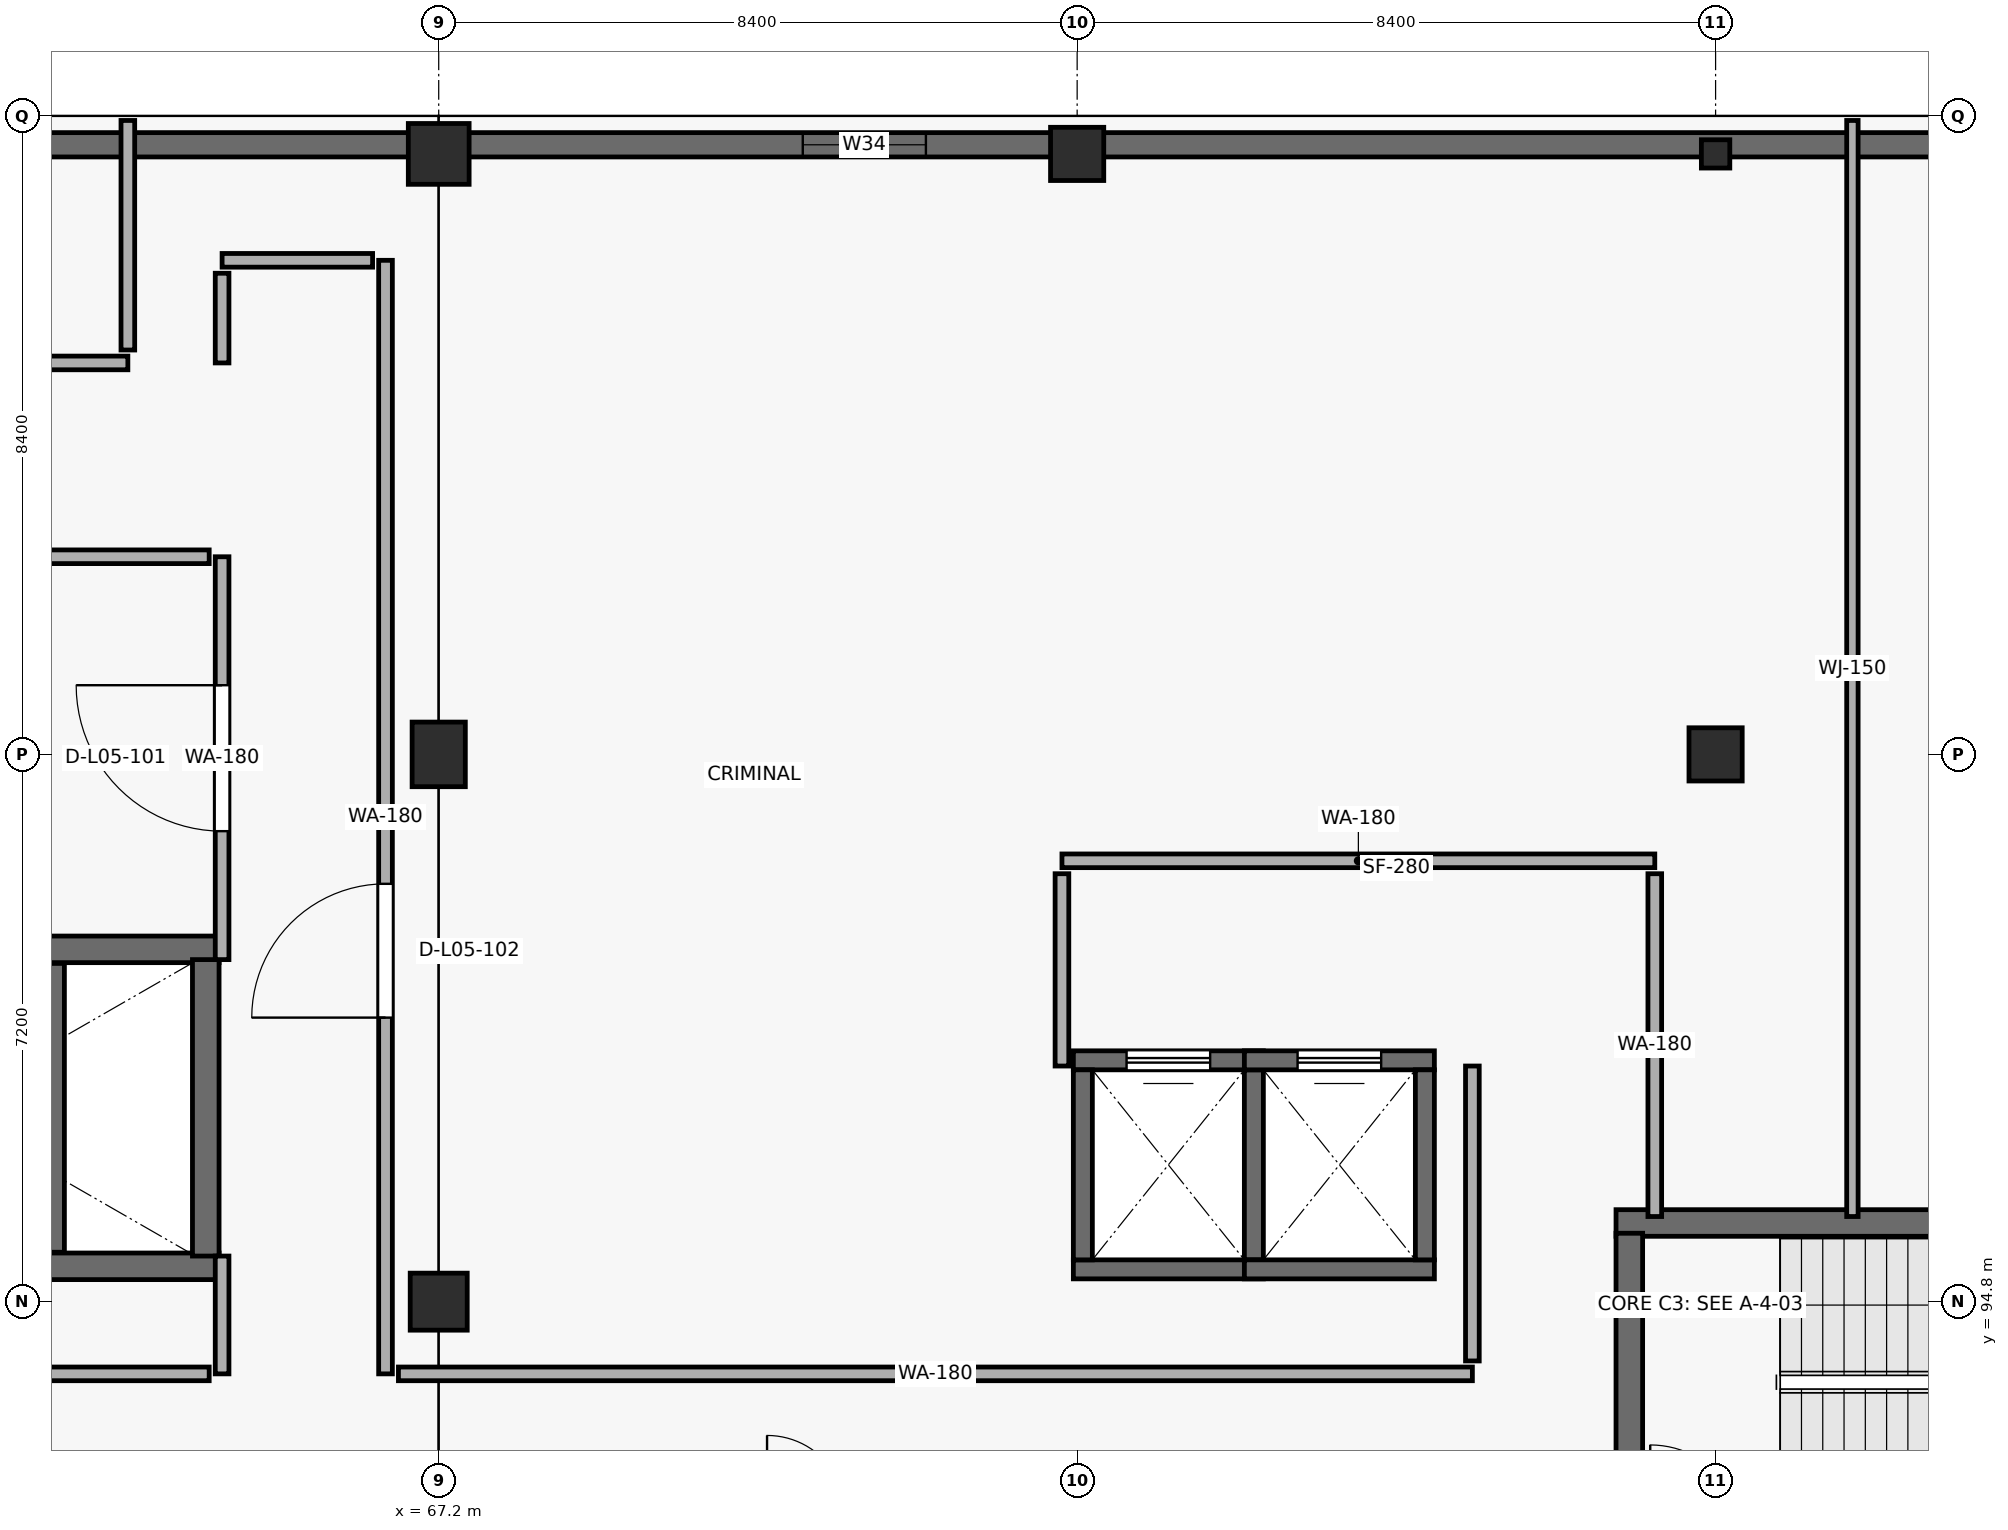
"""IFC4 building model, lengths in metres.
Left out: names, types, materials, properties, quantities, classifications, styles, units other than length and angle.
Written with IfcOpenShell. Run it as: python <this file> out.ifc"""

import sys

from ifc_helpers import new_model, si_unit, direction, frame, frame_2d, origin, origin_2d, place, context, subcontext, project, spatial, rectangle, i_section, extrude, element, fill, save


model = new_model("IFC4")
c1 = context("Model", 3, precision=1e-05, world=origin(), true_north=direction((0.0, 1.0)))
c2 = subcontext(c1, "Body", "Model", "MODEL_VIEW")
j1 = project(units=[si_unit("LENGTHUNIT", "METRE"), si_unit("PLANEANGLEUNIT", "RADIAN")], contexts=[c1])
p1 = place(None, origin())
s1 = spatial("IfcSite", under=j1, at=p1, CompositionType="ELEMENT")
p2 = place(p1, origin())
s2 = spatial("IfcBuilding", under=s1, at=p2, CompositionType="ELEMENT")
p3 = place(p2, frame((0.0, 0.0, 20.4)))
s3 = spatial("IfcBuildingStorey", under=s2, at=p3, CompositionType="ELEMENT", Elevation=20.4)
p4 = place(p3, frame((67.2, 94.8, 0.0), z_axis=(0.0, 0.0, 1.0), x_axis=(1.0, 0.0, 0.0)))
e1 = element("IfcColumn", 1, at=p4, inside=s3, PredefinedType="COLUMN", context=c2, shape_type="SweptSolid", body=[
    extrude(rectangle(XDim=0.75, YDim=0.75, at=origin_2d()), origin(), (0.0, 0.0, 1.0), 5.1),
])
p5 = place(p3, frame((67.2, 102.0, 0.0), z_axis=(0.0, 0.0, 1.0), x_axis=(1.0, 0.0, 0.0)))
e2 = element("IfcColumn", 2, at=p5, inside=s3, PredefinedType="COLUMN", context=c2, shape_type="SweptSolid", body=[
    extrude(rectangle(XDim=0.7, YDim=0.85, at=origin_2d()), origin(), (0.0, 0.0, 1.0), 5.1),
])
p6 = place(p3, frame((67.2, 109.9, 0.0), z_axis=(0.0, 0.0, 1.0), x_axis=(1.0, 0.0, 0.0)))
e3 = element("IfcColumn", 3, at=p6, inside=s3, PredefinedType="COLUMN", context=c2, shape_type="SweptSolid", body=[
    extrude(rectangle(XDim=0.8, YDim=0.8, at=origin_2d()), origin(), (0.0, 0.0, 1.0), 5.1),
])
for number, where, z_axis, x_axis in (
    (4, (75.6, 109.9, 0.0), (0.0, 0.0, 1.0), (1.0, 0.0, 0.0)),
    (5, (84.0, 102.0, 0.0), (0.0, 0.0, 1.0), (1.0, 0.0, 0.0)),
):
    element("IfcColumn", number, at=place(p3, frame(where, z_axis=z_axis, x_axis=x_axis)), inside=s3, PredefinedType="COLUMN", context=c2, shape_type="SweptSolid", body=[
        extrude(rectangle(XDim=0.7, YDim=0.7, at=origin_2d()), origin(), (0.0, 0.0, 1.0), 5.1),
    ])
p7 = place(p3, frame((84.0, 109.9, 0.0), z_axis=(0.0, 0.0, 1.0), x_axis=(1.0, 0.0, 0.0)))
e6 = element("IfcColumn", 6, at=p7, inside=s3, PredefinedType="COLUMN", context=c2, shape_type="SweptSolid", body=[
    extrude(i_section(OverallWidth=0.374, OverallDepth=0.372, WebThickness=0.016, FlangeThickness=0.026, at=origin_2d()), origin(), (0.0, 0.0, 1.0), 5.1),
])
p8 = place(p3, frame((33.6, 110.02, 0.0), z_axis=(0.0, 0.0, 1.0), x_axis=(1.0, 0.0, 0.0)))
e7 = element("IfcWall", 7, at=p8, inside=s3, PredefinedType="SOLIDWALL", context=c2, shape_type="SweptSolid", body=[
    extrude(rectangle(XDim=33.6, YDim=0.32, at=frame_2d((16.8, 0.0))), origin(), (0.0, 0.0, 1.0), 4.84),
])
p9 = place(p3, frame((67.2, 110.02, 0.0), z_axis=(0.0, 0.0, 1.0), x_axis=(1.0, 0.0, 0.0)))
e8 = element("IfcWall", 8, at=p9, inside=s3, PredefinedType="SOLIDWALL", context=c2, shape_type="SweptSolid", body=[
    extrude(rectangle(XDim=25.2, YDim=0.32, at=frame_2d((12.6, 0.0))), origin(), (0.0, 0.0, 1.0), 4.84),
])
p10 = place(p9, frame((4.79, 0.0, 0.75)))
e9 = element("IfcOpeningElement", 9, at=p10, cuts=e8, PredefinedType="OPENING", context=c2, shape_type="SweptSolid", body=[
    extrude(rectangle(XDim=1.62, YDim=3.05, at=frame_2d((0.81, 1.525))), frame((0.0, 0.17, 0.0), z_axis=(0.0, -1.0, 0.0), x_axis=(1.0, 0.0, 0.0)), (0.0, 0.0, 1.0), 0.34),
])
p11 = place(p3, frame((55.09, 95.265, 0.0), z_axis=(0.0, 0.0, 1.0), x_axis=(1.0, 0.0, 0.0)))
e10 = element("IfcWall", 10, at=p11, inside=s3, PredefinedType="SHEAR", context=c2, shape_type="SweptSolid", body=[
    extrude(rectangle(XDim=9.22, YDim=0.35, at=frame_2d((4.61, 0.0))), origin(), (0.0, 0.0, 1.0), 4.84),
])
p12 = place(p11, frame((0.45, 0.0, 0.0)))
e11 = element("IfcOpeningElement", 11, at=p12, cuts=e10, PredefinedType="OPENING", context=c2, shape_type="SweptSolid", body=[
    extrude(rectangle(XDim=1.25, YDim=2.2, at=frame_2d((0.625, 1.1))), frame((0.0, 0.185, 0.0), z_axis=(0.0, -1.0, 0.0), x_axis=(1.0, 0.0, 0.0)), (0.0, 0.0, 1.0), 0.37),
])
p13 = place(p3, frame((64.31, 99.435, 0.0), z_axis=(0.0, 0.0, 1.0), x_axis=(-1.0, 0.0, 0.0)))
e12 = element("IfcWall", 12, at=p13, inside=s3, PredefinedType="SHEAR", context=c2, shape_type="SweptSolid", body=[
    extrude(rectangle(XDim=9.22, YDim=0.35, at=frame_2d((4.61, 0.0))), origin(), (0.0, 0.0, 1.0), 4.84),
])
p14 = place(p13, frame((7.72, 0.0, 0.0)))
e13 = element("IfcOpeningElement", 13, at=p14, cuts=e12, PredefinedType="OPENING", context=c2, shape_type="SweptSolid", body=[
    extrude(rectangle(XDim=1.2, YDim=2.2, at=frame_2d((0.6, 1.1))), frame((0.0, 0.185, 0.0), z_axis=(0.0, -1.0, 0.0), x_axis=(1.0, 0.0, 0.0)), (0.0, 0.0, 1.0), 0.37),
])
p15 = place(p3, frame((64.135, 99.3, 0.0), z_axis=(0.0, 0.0, 1.0), x_axis=(0.0, -1.0, 0.0)))
e14 = element("IfcWall", 14, at=p15, inside=s3, PredefinedType="SHEAR", context=c2, shape_type="SweptSolid", body=[
    extrude(rectangle(XDim=3.9, YDim=0.35, at=frame_2d((1.95, 0.0))), origin(), (0.0, 0.0, 1.0), 4.84),
])
p16 = place(p3, frame((62.15, 95.45, 0.0), z_axis=(0.0, 0.0, 1.0), x_axis=(0.0, 1.0, 0.0)))
e15 = element("IfcWall", 15, at=p16, inside=s3, PredefinedType="SHEAR", context=c2, shape_type="SweptSolid", body=[
    extrude(rectangle(XDim=3.8, YDim=0.25, at=frame_2d((1.9, 0.0))), origin(), (0.0, 0.0, 1.0), 2.37),
])
p17 = place(p3, frame((92.1, 95.835, 0.0), z_axis=(0.0, 0.0, 1.0), x_axis=(-1.0, 0.0, 0.0)))
e16 = element("IfcWall", 16, at=p17, inside=s3, PredefinedType="SHEAR", context=c2, shape_type="SweptSolid", body=[
    extrude(rectangle(XDim=9.41, YDim=0.35, at=frame_2d((4.705, 0.0))), origin(), (0.0, 0.0, 1.0), 4.84),
])
p18 = place(p3, frame((82.865, 91.8, 0.0), z_axis=(0.0, 0.0, 1.0), x_axis=(0.0, 1.0, 0.0)))
e17 = element("IfcWall", 17, at=p18, inside=s3, PredefinedType="SHEAR", context=c2, shape_type="SweptSolid", body=[
    extrude(rectangle(XDim=3.9, YDim=0.35, at=frame_2d((1.95, 0.0))), origin(), (0.0, 0.0, 1.0), 4.84),
])
p19 = place(p3, frame((75.55, 95.225, 0.0), z_axis=(0.0, 0.0, 1.0), x_axis=(1.0, 0.0, 0.0)))
e18 = element("IfcWall", 18, at=p19, inside=s3, PredefinedType="SHEAR", context=c2, shape_type="SweptSolid", body=[
    extrude(rectangle(XDim=2.5, YDim=0.25, at=frame_2d((1.25, 0.0))), origin(), (0.0, 0.0, 1.0), 4.84),
])
p20 = place(p3, frame((78.05, 97.975, 0.0), z_axis=(0.0, 0.0, 1.0), x_axis=(-1.0, 0.0, 0.0)))
e19 = element("IfcWall", 19, at=p20, inside=s3, PredefinedType="SHEAR", context=c2, shape_type="SweptSolid", body=[
    extrude(rectangle(XDim=2.5, YDim=0.25, at=frame_2d((1.25, 0.0))), origin(), (0.0, 0.0, 1.0), 4.84),
])
p21 = place(p20, frame((0.7, 0.0, 0.0)))
e20 = element("IfcOpeningElement", 20, at=p21, cuts=e19, PredefinedType="OPENING", context=c2, shape_type="SweptSolid", body=[
    extrude(rectangle(XDim=1.1, YDim=2.2, at=frame_2d((0.55, 1.1))), frame((0.0, 0.135, 0.0), z_axis=(0.0, -1.0, 0.0), x_axis=(1.0, 0.0, 0.0)), (0.0, 0.0, 1.0), 0.27),
])
for number, where, z_axis, x_axis in (
    (21, (75.675, 95.35, 0.0), (0.0, 0.0, 1.0), (0.0, 1.0, 0.0)),
    (22, (77.925, 97.85, 0.0), (0.0, 0.0, 1.0), (0.0, -1.0, 0.0)),
    (23, (77.8, 95.225, 0.0), (0.0, 0.0, 1.0), (1.0, 0.0, 0.0)),
):
    element("IfcWall", number, at=place(p3, frame(where, z_axis=z_axis, x_axis=x_axis)), inside=s3, PredefinedType="SHEAR", context=c2, shape_type="SweptSolid", body=[
        extrude(rectangle(XDim=2.5, YDim=0.25, at=frame_2d((1.25, 0.0))), origin(), (0.0, 0.0, 1.0), 4.84),
    ])
p22 = place(p3, frame((80.3, 97.975, 0.0), z_axis=(0.0, 0.0, 1.0), x_axis=(-1.0, 0.0, 0.0)))
e24 = element("IfcWall", 24, at=p22, inside=s3, PredefinedType="SHEAR", context=c2, shape_type="SweptSolid", body=[
    extrude(rectangle(XDim=2.5, YDim=0.25, at=frame_2d((1.25, 0.0))), origin(), (0.0, 0.0, 1.0), 4.84),
])
p23 = place(p22, frame((0.7, 0.0, 0.0)))
e25 = element("IfcOpeningElement", 25, at=p23, cuts=e24, PredefinedType="OPENING", context=c2, shape_type="SweptSolid", body=[
    extrude(rectangle(XDim=1.1, YDim=2.2, at=frame_2d((0.55, 1.1))), frame((0.0, 0.135, 0.0), z_axis=(0.0, -1.0, 0.0), x_axis=(1.0, 0.0, 0.0)), (0.0, 0.0, 1.0), 0.27),
])
p24 = place(p3, frame((80.175, 97.85, 0.0), z_axis=(0.0, 0.0, 1.0), x_axis=(0.0, -1.0, 0.0)))
e26 = element("IfcWall", 26, at=p24, inside=s3, PredefinedType="SHEAR", context=c2, shape_type="SweptSolid", body=[
    extrude(rectangle(XDim=2.5, YDim=0.25, at=frame_2d((1.25, 0.0))), origin(), (0.0, 0.0, 1.0), 4.84),
])
p25 = place(p3, frame((66.5, 93.85, 0.0), z_axis=(0.0, 0.0, 1.0), x_axis=(0.0, 1.0, 0.0)))
e27 = element("IfcWall", 27, at=p25, inside=s3, PredefinedType="PARTITIONING", context=c2, shape_type="SweptSolid", body=[
    extrude(rectangle(XDim=14.65, YDim=0.18, at=frame_2d((7.325, 0.0))), origin(), (0.0, 0.0, 1.0), 4.84),
])
p26 = place(p25, frame((4.687, 0.0, 0.0)))
e28 = element("IfcOpeningElement", 28, at=p26, cuts=e27, PredefinedType="OPENING", context=c2, shape_type="SweptSolid", body=[
    extrude(rectangle(XDim=1.76, YDim=2.48, at=frame_2d((0.88, 1.24))), frame((0.0, 0.1, 0.0), z_axis=(0.0, -1.0, 0.0), x_axis=(1.0, 0.0, 0.0)), (0.0, 0.0, 1.0), 0.2),
])
p27 = place(p3, frame((85.8, 95.92, 0.0), z_axis=(0.0, 0.0, 1.0), x_axis=(0.0, 1.0, 0.0)))
e29 = element("IfcWall", 29, at=p27, inside=s3, PredefinedType="PARTITIONING", context=c2, shape_type="SweptSolid", body=[
    extrude(rectangle(XDim=14.42, YDim=0.15, at=frame_2d((7.21, 0.0))), origin(), (0.0, 0.0, 1.0), 4.84),
])
p28 = place(p3, frame((80.8, 93.85, 0.0), z_axis=(0.0, 0.0, 1.0), x_axis=(-1.0, 0.0, 0.0)))
e30 = element("IfcWall", 30, at=p28, inside=s3, PredefinedType="PARTITIONING", context=c2, shape_type="SweptSolid", body=[
    extrude(rectangle(XDim=14.13, YDim=0.18, at=frame_2d((7.065, 0.0))), origin(), (0.0, 0.0, 1.0), 4.84),
])
p29 = place(p3, frame((63.11, 107.15, 0.0), z_axis=(0.0, 0.0, 1.0), x_axis=(-1.0, 0.0, 0.0)))
e31 = element("IfcWall", 31, at=p29, inside=s3, PredefinedType="PARTITIONING", context=c2, shape_type="SweptSolid", body=[
    extrude(rectangle(XDim=10.76, YDim=0.18, at=frame_2d((5.38, 0.0))), origin(), (0.0, 0.0, 1.0), 4.84),
])
p30 = place(p3, frame((64.35, 104.6, 0.0), z_axis=(0.0, 0.0, 1.0), x_axis=(0.0, -1.0, 0.0)))
e32 = element("IfcWall", 32, at=p30, inside=s3, PredefinedType="PARTITIONING", context=c2, shape_type="SweptSolid", body=[
    extrude(rectangle(XDim=5.3, YDim=0.18, at=frame_2d((2.65, 0.0))), origin(), (0.0, 0.0, 1.0), 4.84),
])
p31 = place(p30, frame((1.69, 0.0, 0.0)))
e33 = element("IfcOpeningElement", 33, at=p31, cuts=e32, PredefinedType="OPENING", context=c2, shape_type="SweptSolid", body=[
    extrude(rectangle(XDim=1.92, YDim=2.55, at=frame_2d((0.96, 1.275))), frame((0.0, 0.1, 0.0), z_axis=(0.0, -1.0, 0.0), x_axis=(1.0, 0.0, 0.0)), (0.0, 0.0, 1.0), 0.2),
])
p32 = place(p3, frame((64.35, 95.4, 0.0), z_axis=(0.0, 0.0, 1.0), x_axis=(0.0, -1.0, 0.0)))
e34 = element("IfcWall", 34, at=p32, inside=s3, PredefinedType="PARTITIONING", context=c2, shape_type="SweptSolid", body=[
    extrude(rectangle(XDim=1.55, YDim=0.18, at=frame_2d((0.775, 0.0))), origin(), (0.0, 0.0, 1.0), 4.84),
])
p33 = place(p3, frame((83.2, 100.6, 0.0), z_axis=(0.0, 0.0, 1.0), x_axis=(-1.0, 0.0, 0.0)))
e35 = element("IfcWall", 35, at=p33, inside=s3, PredefinedType="PARTITIONING", context=c2, shape_type="SweptSolid", body=[
    extrude(rectangle(XDim=7.8, YDim=0.18, at=frame_2d((3.9, 0.0))), origin(), (0.0, 0.0, 1.0), 4.84),
])
p34 = place(p3, frame((83.2, 95.92, 0.0), z_axis=(0.0, 0.0, 1.0), x_axis=(0.0, 1.0, 0.0)))
e36 = element("IfcWall", 36, at=p34, inside=s3, PredefinedType="PARTITIONING", context=c2, shape_type="SweptSolid", body=[
    extrude(rectangle(XDim=4.51, YDim=0.18, at=frame_2d((2.255, 0.0))), origin(), (0.0, 0.0, 1.0), 4.84),
])
for number, where, z_axis, x_axis in (
    (37, (60.1, 104.6, 0.0), (0.0, 0.0, 1.0), (1.0, 0.0, 0.0)),
    (38, (64.18, 93.85, 0.0), (0.0, 0.0, 1.0), (-1.0, 0.0, 0.0)),
):
    element("IfcWall", number, at=place(p3, frame(where, z_axis=z_axis, x_axis=x_axis)), inside=s3, PredefinedType="PARTITIONING", context=c2, shape_type="SweptSolid", body=[
        extrude(rectangle(XDim=4.08, YDim=0.18, at=frame_2d((2.04, 0.0))), origin(), (0.0, 0.0, 1.0), 4.84),
    ])
p35 = place(p3, frame((80.8, 97.9, 0.0), z_axis=(0.0, 0.0, 1.0), x_axis=(0.0, -1.0, 0.0)))
e39 = element("IfcWall", 39, at=p35, inside=s3, PredefinedType="PARTITIONING", context=c2, shape_type="SweptSolid", body=[
    extrude(rectangle(XDim=3.88, YDim=0.18, at=frame_2d((1.94, 0.0))), origin(), (0.0, 0.0, 1.0), 4.84),
])
p36 = place(p3, frame((63.11, 110.34, 0.0), z_axis=(0.0, 0.0, 1.0), x_axis=(0.0, -1.0, 0.0)))
e40 = element("IfcWall", 40, at=p36, inside=s3, PredefinedType="PARTITIONING", context=c2, shape_type="SweptSolid", body=[
    extrude(rectangle(XDim=3.02, YDim=0.18, at=frame_2d((1.51, 0.0))), origin(), (0.0, 0.0, 1.0), 4.84),
])
p37 = place(p3, frame((75.4, 100.43, 0.0), z_axis=(0.0, 0.0, 1.0), x_axis=(0.0, -1.0, 0.0)))
e41 = element("IfcWall", 41, at=p37, inside=s3, PredefinedType="PARTITIONING", context=c2, shape_type="SweptSolid", body=[
    extrude(rectangle(XDim=2.53, YDim=0.18, at=frame_2d((1.265, 0.0))), origin(), (0.0, 0.0, 1.0), 3.45),
])
p38 = place(p3, frame((66.33, 108.5, 0.0), z_axis=(0.0, 0.0, 1.0), x_axis=(-1.0, 0.0, 0.0)))
e42 = element("IfcWall", 42, at=p38, inside=s3, PredefinedType="PARTITIONING", context=c2, shape_type="SweptSolid", body=[
    extrude(rectangle(XDim=1.98, YDim=0.18, at=frame_2d((0.99, 0.0))), origin(), (0.0, 0.0, 1.0), 4.84),
])
p39 = place(p3, frame((64.35, 108.33, 0.0), z_axis=(0.0, 0.0, 1.0), x_axis=(0.0, -1.0, 0.0)))
e43 = element("IfcWall", 43, at=p39, inside=s3, PredefinedType="PARTITIONING", context=c2, shape_type="SweptSolid", body=[
    extrude(rectangle(XDim=1.18, YDim=0.18, at=frame_2d((0.59, 0.0))), origin(), (0.0, 0.0, 1.0), 4.84),
])
p40 = place(p10, origin())
e44 = element("IfcWindow", 44, at=p40, inside=s3, PartitioningType="SINGLE_PANEL", PredefinedType="WINDOW", context=c2, shape_type="SweptSolid", body=[
    extrude(rectangle(XDim=1.62, YDim=3.05, at=frame_2d((0.81, 1.525))), frame((0.0, 0.03, 0.0), z_axis=(0.0, -1.0, 0.0), x_axis=(1.0, 0.0, 0.0)), (0.0, 0.0, 1.0), 0.06),
])
fill(e9, e44)
p41 = place(p21, origin())
e45 = element("IfcDoor", 45, at=p41, inside=s3, OperationType="SLIDING_TO_RIGHT", PredefinedType="DOOR", context=c2, shape_type="SweptSolid", body=[
    extrude(rectangle(XDim=1.1, YDim=2.2, at=frame_2d((0.55, 1.1))), frame((0.0, 0.025, 0.0), z_axis=(0.0, -1.0, 0.0), x_axis=(1.0, 0.0, 0.0)), (0.0, 0.0, 1.0), 0.05),
])
fill(e20, e45)
p42 = place(p23, origin())
e46 = element("IfcDoor", 46, at=p42, inside=s3, OperationType="SLIDING_TO_RIGHT", PredefinedType="DOOR", context=c2, shape_type="SweptSolid", body=[
    extrude(rectangle(XDim=1.1, YDim=2.2, at=frame_2d((0.55, 1.1))), frame((0.0, 0.025, 0.0), z_axis=(0.0, -1.0, 0.0), x_axis=(1.0, 0.0, 0.0)), (0.0, 0.0, 1.0), 0.05),
])
fill(e25, e46)
p43 = place(p31, origin())
e47 = element("IfcDoor", 47, at=p43, inside=s3, OperationType="SINGLE_SWING_RIGHT", PredefinedType="DOOR", context=c2, shape_type="SweptSolid", body=[
    extrude(rectangle(XDim=1.92, YDim=2.55, at=frame_2d((0.96, 1.275))), frame((0.0, 0.025, 0.0), z_axis=(0.0, -1.0, 0.0), x_axis=(1.0, 0.0, 0.0)), (0.0, 0.0, 1.0), 0.05),
])
fill(e33, e47)
p44 = place(p26, origin())
e48 = element("IfcDoor", 48, at=p44, inside=s3, OperationType="SINGLE_SWING_LEFT", PredefinedType="DOOR", context=c2, shape_type="SweptSolid", body=[
    extrude(rectangle(XDim=1.76, YDim=2.48, at=frame_2d((0.88, 1.24))), frame((0.0, 0.025, 0.0), z_axis=(0.0, -1.0, 0.0), x_axis=(1.0, 0.0, 0.0)), (0.0, 0.0, 1.0), 0.05),
])
fill(e28, e48)
save(model, sys.argv[1])
